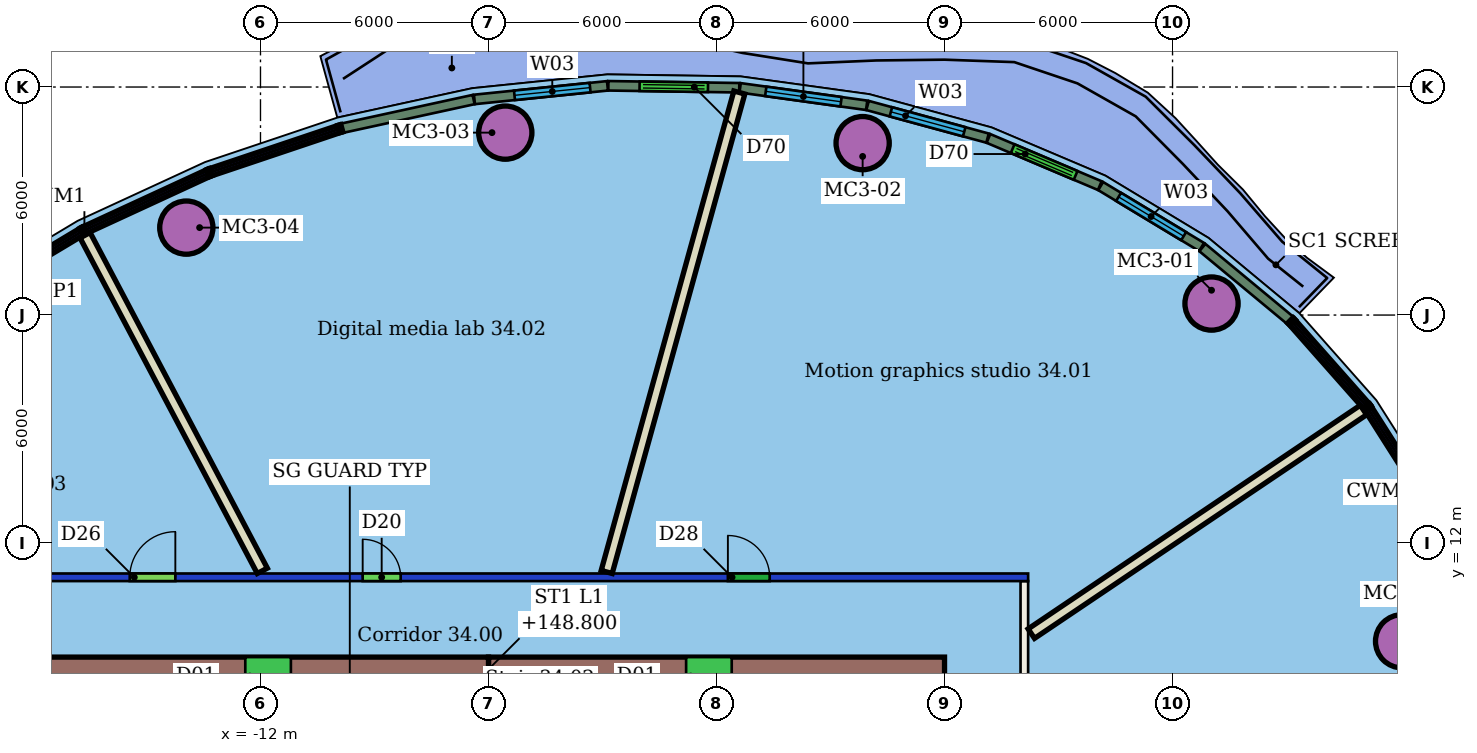
"""IFC4 building model, lengths in metres.
Left out: names, types, materials, properties, quantities, classifications, styles, units other than length and angle.
Written with IfcOpenShell. Run it as: python <this file> out.ifc"""

import sys

from ifc_helpers import new_model, si_unit, direction, frame, frame_2d, origin, origin_2d, place, context, subcontext, project, spatial, rectangle, hollow_circle, extrude, element, fill, save


model = new_model("IFC4")
c1 = context("Model", 3, precision=1e-05, world=origin(), true_north=direction((0.0, 1.0)))
c2 = subcontext(c1, "Body", "Model", "MODEL_VIEW")
j1 = project(units=[si_unit("LENGTHUNIT", "METRE"), si_unit("PLANEANGLEUNIT", "RADIAN")], contexts=[c1])
p1 = place(None, origin())
s1 = spatial("IfcSite", under=j1, at=p1, CompositionType="ELEMENT")
p2 = place(p1, origin())
s2 = spatial("IfcBuilding", under=s1, at=p2, CompositionType="ELEMENT")
p3 = place(p2, frame((0.0, 0.0, 147.0)))
s3 = spatial("IfcBuildingStorey", under=s2, at=p3, CompositionType="ELEMENT", Elevation=147.0)
for number, where, z_axis, x_axis in (
    (1, (13.026, 18.303, 0.0), (0.0, 0.0, 1.0), (1.0, 0.0, 0.0)),
    (2, (3.845, 22.524, 0.0), (0.0, 0.0, 1.0), (1.0, 0.0, 0.0)),
    (3, (-5.558, 22.8, 0.0), (0.0, 0.0, 1.0), (1.0, 0.0, 0.0)),
    (4, (-13.952, 20.301, 0.0), (0.0, 0.0, 1.0), (1.0, 0.0, 0.0)),
    (5, (18.041, 9.417, 0.0), (0.0, 0.0, 1.0), (1.0, 0.0, 0.0)),
):
    element("IfcColumn", number, at=place(p3, frame(where, z_axis=z_axis, x_axis=x_axis)), inside=s3, PredefinedType="COLUMN", context=c2, shape_type="SweptSolid", body=[
        extrude(hollow_circle(Radius=0.7, WallThickness=0.05, at=origin_2d()), origin(), (0.0, 0.0, 1.0), 3.45),
    ])
p4 = place(p3, frame((-20.2, 11.1, 0.0), z_axis=(0.0, 0.0, 1.0), x_axis=(1.0, 0.0, 0.0)))
e6 = element("IfcWall", 6, at=p4, inside=s3, PredefinedType="PARTITIONING", context=c2, shape_type="SweptSolid", body=[
    extrude(rectangle(XDim=28.4, YDim=0.2, at=frame_2d((14.2, 0.0))), origin(), (0.0, 0.0, 1.0), 3.05),
])
p5 = place(p4, frame((20.499, 0.0, 0.0)))
e7 = element("IfcOpeningElement", 7, at=p5, cuts=e6, PredefinedType="OPENING", context=c2, shape_type="SweptSolid", body=[
    extrude(rectangle(XDim=1.1, YDim=2.1, at=frame_2d((0.55, 1.05))), frame((0.0, 0.11, 0.0), z_axis=(0.0, -1.0, 0.0), x_axis=(1.0, 0.0, 0.0)), (0.0, 0.0, 1.0), 0.22),
])
p6 = place(p4, frame((10.889, 0.0, 0.0)))
e8 = element("IfcOpeningElement", 8, at=p6, cuts=e6, PredefinedType="OPENING", context=c2, shape_type="SweptSolid", body=[
    extrude(rectangle(XDim=1.0, YDim=2.1, at=frame_2d((0.5, 1.05))), frame((0.0, 0.11, 0.0), z_axis=(0.0, -1.0, 0.0), x_axis=(1.0, 0.0, 0.0)), (0.0, 0.0, 1.0), 0.22),
])
p7 = place(p4, frame((4.76, 0.0, 0.0)))
e9 = element("IfcOpeningElement", 9, at=p7, cuts=e6, PredefinedType="OPENING", context=c2, shape_type="SweptSolid", body=[
    extrude(rectangle(XDim=1.2, YDim=2.1, at=frame_2d((0.6, 1.05))), frame((0.0, 0.11, 0.0), z_axis=(0.0, -1.0, 0.0), x_axis=(1.0, 0.0, 0.0)), (0.0, 0.0, 1.0), 0.22),
])
p8 = place(p3, frame((8.1, 11.0, 0.0), z_axis=(0.0, 0.0, 1.0), x_axis=(0.0, -1.0, 0.0)))
e10 = element("IfcWall", 10, at=p8, inside=s3, PredefinedType="PARTITIONING", context=c2, shape_type="SweptSolid", body=[
    extrude(rectangle(XDim=22.0, YDim=0.2, at=frame_2d((11.0, 0.0))), origin(), (0.0, 0.0, 1.0), 3.45),
])
p9 = place(p8, frame((16.187, 0.0, 0.0)))
e11 = element("IfcOpeningElement", 11, at=p9, cuts=e10, PredefinedType="OPENING", context=c2, shape_type="SweptSolid", body=[
    extrude(rectangle(XDim=1.2, YDim=2.1, at=frame_2d((0.6, 1.05))), frame((0.0, 0.11, 0.0), z_axis=(0.0, -1.0, 0.0), x_axis=(1.0, 0.0, 0.0)), (0.0, 0.0, 1.0), 0.22),
])
p10 = place(p8, frame((8.659, 0.0, 0.0)))
e12 = element("IfcOpeningElement", 12, at=p10, cuts=e10, PredefinedType="OPENING", context=c2, shape_type="SweptSolid", body=[
    extrude(rectangle(XDim=1.8, YDim=2.1, at=frame_2d((0.9, 1.05))), frame((0.0, 0.11, 0.0), z_axis=(0.0, -1.0, 0.0), x_axis=(1.0, 0.0, 0.0)), (0.0, 0.0, 1.0), 0.22),
])
p11 = place(p3, frame((17.024, 15.502, 0.0), z_axis=(0.0, 0.0, 1.0), x_axis=(-0.82951075197, -0.558490745104, 0.0)))
e13 = element("IfcWall", 13, at=p11, inside=s3, PredefinedType="PARTITIONING", context=c2, shape_type="SweptSolid", body=[
    extrude(rectangle(XDim=10.537, YDim=0.3, at=frame_2d((5.269, 0.0))), origin(), (0.0, 0.0, 1.0), 3.45),
])
p12 = place(p3, frame((0.601, 23.856, 0.0), z_axis=(0.0, 0.0, 1.0), x_axis=(-0.266671206276, -0.963787563597, 0.0)))
e14 = element("IfcWall", 14, at=p12, inside=s3, PredefinedType="PARTITIONING", context=c2, shape_type="SweptSolid", body=[
    extrude(rectangle(XDim=13.09, YDim=0.3, at=frame_2d((6.545, 0.0))), origin(), (0.0, 0.0, 1.0), 3.45),
])
p13 = place(p3, frame((-16.616, 20.101, 0.0), z_axis=(0.0, 0.0, 1.0), x_axis=(0.467001313274, -0.884256621915, 0.0)))
e15 = element("IfcWall", 15, at=p13, inside=s3, PredefinedType="PARTITIONING", context=c2, shape_type="SweptSolid", body=[
    extrude(rectangle(XDim=9.987, YDim=0.3, at=frame_2d((4.994, 0.0))), origin(), (0.0, 0.0, 1.0), 3.45),
])
p14 = place(p3, frame((15.088, 17.867, 0.0), z_axis=(0.0, 0.0, 1.0), x_axis=(-0.769904678532, 0.638158903389, 0.0)))
e16 = element("IfcWall", 16, at=p14, inside=s3, PredefinedType="SOLIDWALL", context=c2, shape_type="SweptSolid", body=[
    extrude(rectangle(XDim=2.991, YDim=0.25, at=frame_2d((1.496, 0.0))), origin(), (0.0, 0.0, 1.0), 3.1),
])
p15 = place(p3, frame((12.763, 19.791, 0.0), z_axis=(0.0, 0.0, 1.0), x_axis=(-0.856079561846, 0.516844061386, 0.0)))
e17 = element("IfcWall", 17, at=p15, inside=s3, PredefinedType="SOLIDWALL", context=c2, shape_type="SweptSolid", body=[
    extrude(rectangle(XDim=3.101, YDim=0.25, at=frame_2d((1.551, 0.0))), origin(), (0.0, 0.0, 1.0), 3.1),
])
p16 = place(p15, frame((0.551, 0.0, 0.9)))
e18 = element("IfcOpeningElement", 18, at=p16, cuts=e17, PredefinedType="OPENING", context=c2, shape_type="SweptSolid", body=[
    extrude(rectangle(XDim=2.0, YDim=2.1, at=frame_2d((1.0, 1.05))), frame((0.0, 0.135, 0.0), z_axis=(0.0, -1.0, 0.0), x_axis=(1.0, 0.0, 0.0)), (0.0, 0.0, 1.0), 0.27),
])
p17 = place(p3, frame((10.086, 21.406, 0.0), z_axis=(0.0, 0.0, 1.0), x_axis=(-0.920752187735, 0.390147931919, 0.0)))
e19 = element("IfcWall", 19, at=p17, inside=s3, PredefinedType="SOLIDWALL", context=c2, shape_type="SweptSolid", body=[
    extrude(rectangle(XDim=3.183, YDim=0.25, at=frame_2d((1.591, 0.0))), origin(), (0.0, 0.0, 1.0), 3.1),
])
p18 = place(p17, frame((0.691, 0.0, 0.0)))
e20 = element("IfcOpeningElement", 20, at=p18, cuts=e19, PredefinedType="OPENING", context=c2, shape_type="SweptSolid", body=[
    extrude(rectangle(XDim=1.8, YDim=2.4, at=frame_2d((0.9, 1.2))), frame((0.0, 0.135, 0.0), z_axis=(0.0, -1.0, 0.0), x_axis=(1.0, 0.0, 0.0)), (0.0, 0.0, 1.0), 0.27),
])
p19 = place(p3, frame((7.132, 22.656, 0.0), z_axis=(0.0, 0.0, 1.0), x_axis=(-0.964946127674, 0.262448034261, 0.0)))
e21 = element("IfcWall", 21, at=p19, inside=s3, PredefinedType="SOLIDWALL", context=c2, shape_type="SweptSolid", body=[
    extrude(rectangle(XDim=3.272, YDim=0.25, at=frame_2d((1.636, 0.0))), origin(), (0.0, 0.0, 1.0), 3.1),
])
p20 = place(p19, frame((0.636, 0.0, 0.9)))
e22 = element("IfcOpeningElement", 22, at=p20, cuts=e21, PredefinedType="OPENING", context=c2, shape_type="SweptSolid", body=[
    extrude(rectangle(XDim=2.0, YDim=2.1, at=frame_2d((1.0, 1.05))), frame((0.0, 0.135, 0.0), z_axis=(0.0, -1.0, 0.0), x_axis=(1.0, 0.0, 0.0)), (0.0, 0.0, 1.0), 0.27),
])
p21 = place(p3, frame((3.951, 23.519, 0.0), z_axis=(0.0, 0.0, 1.0), x_axis=(-0.990602473809, 0.13677258089, 0.0)))
e23 = element("IfcWall", 23, at=p21, inside=s3, PredefinedType="SOLIDWALL", context=c2, shape_type="SweptSolid", body=[
    extrude(rectangle(XDim=3.361, YDim=0.25, at=frame_2d((1.681, 0.0))), origin(), (0.0, 0.0, 1.0), 3.1),
])
p22 = place(p21, frame((0.681, 0.0, 0.9)))
e24 = element("IfcOpeningElement", 24, at=p22, cuts=e23, PredefinedType="OPENING", context=c2, shape_type="SweptSolid", body=[
    extrude(rectangle(XDim=2.0, YDim=2.1, at=frame_2d((1.0, 1.05))), frame((0.0, 0.135, 0.0), z_axis=(0.0, -1.0, 0.0), x_axis=(1.0, 0.0, 0.0)), (0.0, 0.0, 1.0), 0.27),
])
p23 = place(p3, frame((0.598, 23.981, 0.0), z_axis=(0.0, 0.0, 1.0), x_axis=(-0.999886095883, 0.015092887706, 0.0)))
e25 = element("IfcWall", 25, at=p23, inside=s3, PredefinedType="SOLIDWALL", context=c2, shape_type="SweptSolid", body=[
    extrude(rectangle(XDim=3.446, YDim=0.25, at=frame_2d((1.723, 0.0))), origin(), (0.0, 0.0, 1.0), 3.1),
])
p24 = place(p23, frame((0.823, 0.0, 0.0)))
e26 = element("IfcOpeningElement", 26, at=p24, cuts=e25, PredefinedType="OPENING", context=c2, shape_type="SweptSolid", body=[
    extrude(rectangle(XDim=1.8, YDim=2.4, at=frame_2d((0.9, 1.2))), frame((0.0, 0.135, 0.0), z_axis=(0.0, -1.0, 0.0), x_axis=(1.0, 0.0, 0.0)), (0.0, 0.0, 1.0), 0.27),
])
p25 = place(p3, frame((-2.869, 24.032, 0.0), z_axis=(0.0, 0.0, 1.0), x_axis=(-0.994814248005, -0.101708465554, 0.0)))
e27 = element("IfcWall", 27, at=p25, inside=s3, PredefinedType="SOLIDWALL", context=c2, shape_type="SweptSolid", body=[
    extrude(rectangle(XDim=3.519, YDim=0.25, at=frame_2d((1.76, 0.0))), origin(), (0.0, 0.0, 1.0), 3.1),
])
p26 = place(p25, frame((0.46, 0.0, 0.9)))
e28 = element("IfcOpeningElement", 28, at=p26, cuts=e27, PredefinedType="OPENING", context=c2, shape_type="SweptSolid", body=[
    extrude(rectangle(XDim=2.0, YDim=2.1, at=frame_2d((1.0, 1.05))), frame((0.0, 0.135, 0.0), z_axis=(0.0, -1.0, 0.0), x_axis=(1.0, 0.0, 0.0)), (0.0, 0.0, 1.0), 0.27),
])
p27 = place(p3, frame((-6.392, 23.67, 0.0), z_axis=(0.0, 0.0, 1.0), x_axis=(-0.97705524613, -0.212986023038, 0.0)))
e29 = element("IfcWall", 29, at=p27, inside=s3, PredefinedType="SOLIDWALL", context=c2, shape_type="SweptSolid", body=[
    extrude(rectangle(XDim=3.534, YDim=0.25, at=frame_2d((1.767, 0.0))), origin(), (0.0, 0.0, 1.0), 3.1),
])
p28 = place(p3, frame((6.0, 8.5, 0.0), z_axis=(0.0, 0.0, 1.0), x_axis=(-1.0, 0.0, 0.0)))
e30 = element("IfcWall", 30, at=p28, inside=s3, PredefinedType="SHEAR", context=c2, shape_type="SweptSolid", body=[
    extrude(rectangle(XDim=12.0, YDim=1.0, at=frame_2d((6.0, 0.0))), origin(), (0.0, 0.0, 1.0), 3.3),
])
p29 = place(p28, frame((5.6, 0.0, 0.0)))
e31 = element("IfcOpeningElement", 31, at=p29, cuts=e30, PredefinedType="OPENING", context=c2, shape_type="SweptSolid", body=[
    extrude(rectangle(XDim=1.2, YDim=2.1, at=frame_2d((0.6, 1.05))), frame((0.0, 0.51, 0.0), z_axis=(0.0, -1.0, 0.0), x_axis=(1.0, 0.0, 0.0)), (0.0, 0.0, 1.0), 1.02),
])
p30 = place(p3, frame((-6.0, 8.5, 0.0), z_axis=(0.0, 0.0, 1.0), x_axis=(-1.0, 0.0, 0.0)))
e32 = element("IfcWall", 32, at=p30, inside=s3, PredefinedType="SHEAR", context=c2, shape_type="SweptSolid", body=[
    extrude(rectangle(XDim=12.0, YDim=1.0, at=frame_2d((6.0, 0.0))), origin(), (0.0, 0.0, 1.0), 3.3),
])
p31 = place(p30, frame((5.2, 0.0, 0.0)))
e33 = element("IfcOpeningElement", 33, at=p31, cuts=e32, PredefinedType="OPENING", context=c2, shape_type="SweptSolid", body=[
    extrude(rectangle(XDim=1.2, YDim=2.1, at=frame_2d((0.6, 1.05))), frame((0.0, 0.51, 0.0), z_axis=(0.0, -1.0, 0.0), x_axis=(1.0, 0.0, 0.0)), (0.0, 0.0, 1.0), 1.02),
])
p32 = place(p5, origin())
e34 = element("IfcDoor", 34, at=p32, inside=s3, OperationType="SINGLE_SWING_LEFT", PredefinedType="DOOR", context=c2, shape_type="SweptSolid", body=[
    extrude(rectangle(XDim=1.1, YDim=2.1, at=frame_2d((0.55, 1.05))), frame((0.0, 0.025, 0.0), z_axis=(0.0, -1.0, 0.0), x_axis=(1.0, 0.0, 0.0)), (0.0, 0.0, 1.0), 0.05),
])
fill(e7, e34)
p33 = place(p6, origin())
e35 = element("IfcDoor", 35, at=p33, inside=s3, OperationType="SINGLE_SWING_LEFT", PredefinedType="DOOR", context=c2, shape_type="SweptSolid", body=[
    extrude(rectangle(XDim=1.0, YDim=2.1, at=frame_2d((0.5, 1.05))), frame((0.0, 0.025, 0.0), z_axis=(0.0, -1.0, 0.0), x_axis=(1.0, 0.0, 0.0)), (0.0, 0.0, 1.0), 0.05),
])
fill(e8, e35)
p34 = place(p7, origin())
e36 = element("IfcDoor", 36, at=p34, inside=s3, OperationType="SINGLE_SWING_RIGHT", PredefinedType="DOOR", context=c2, shape_type="SweptSolid", body=[
    extrude(rectangle(XDim=1.2, YDim=2.1, at=frame_2d((0.6, 1.05))), frame((0.0, 0.025, 0.0), z_axis=(0.0, -1.0, 0.0), x_axis=(1.0, 0.0, 0.0)), (0.0, 0.0, 1.0), 0.05),
])
fill(e9, e36)
p35 = place(p16, origin())
e37 = element("IfcWindow", 37, at=p35, inside=s3, PartitioningType="SINGLE_PANEL", PredefinedType="WINDOW", context=c2, shape_type="SweptSolid", body=[
    extrude(rectangle(XDim=2.0, YDim=2.1, at=frame_2d((1.0, 1.05))), frame((0.0, 0.03, 0.0), z_axis=(0.0, -1.0, 0.0), x_axis=(1.0, 0.0, 0.0)), (0.0, 0.0, 1.0), 0.06),
])
fill(e18, e37)
p36 = place(p18, origin())
e38 = element("IfcDoor", 38, at=p36, inside=s3, OperationType="DOUBLE_DOOR_SLIDING", PredefinedType="DOOR", context=c2, shape_type="SweptSolid", body=[
    extrude(rectangle(XDim=1.8, YDim=2.4, at=frame_2d((0.9, 1.2))), frame((0.0, 0.025, 0.0), z_axis=(0.0, -1.0, 0.0), x_axis=(1.0, 0.0, 0.0)), (0.0, 0.0, 1.0), 0.05),
])
fill(e20, e38)
p37 = place(p20, origin())
e39 = element("IfcWindow", 39, at=p37, inside=s3, PartitioningType="SINGLE_PANEL", PredefinedType="WINDOW", context=c2, shape_type="SweptSolid", body=[
    extrude(rectangle(XDim=2.0, YDim=2.1, at=frame_2d((1.0, 1.05))), frame((0.0, 0.03, 0.0), z_axis=(0.0, -1.0, 0.0), x_axis=(1.0, 0.0, 0.0)), (0.0, 0.0, 1.0), 0.06),
])
fill(e22, e39)
p38 = place(p22, origin())
e40 = element("IfcWindow", 40, at=p38, inside=s3, PartitioningType="SINGLE_PANEL", PredefinedType="WINDOW", context=c2, shape_type="SweptSolid", body=[
    extrude(rectangle(XDim=2.0, YDim=2.1, at=frame_2d((1.0, 1.05))), frame((0.0, 0.03, 0.0), z_axis=(0.0, -1.0, 0.0), x_axis=(1.0, 0.0, 0.0)), (0.0, 0.0, 1.0), 0.06),
])
fill(e24, e40)
p39 = place(p24, origin())
e41 = element("IfcDoor", 41, at=p39, inside=s3, OperationType="DOUBLE_DOOR_SLIDING", PredefinedType="DOOR", context=c2, shape_type="SweptSolid", body=[
    extrude(rectangle(XDim=1.8, YDim=2.4, at=frame_2d((0.9, 1.2))), frame((0.0, 0.025, 0.0), z_axis=(0.0, -1.0, 0.0), x_axis=(1.0, 0.0, 0.0)), (0.0, 0.0, 1.0), 0.05),
])
fill(e26, e41)
p40 = place(p26, origin())
e42 = element("IfcWindow", 42, at=p40, inside=s3, PartitioningType="SINGLE_PANEL", PredefinedType="WINDOW", context=c2, shape_type="SweptSolid", body=[
    extrude(rectangle(XDim=2.0, YDim=2.1, at=frame_2d((1.0, 1.05))), frame((0.0, 0.03, 0.0), z_axis=(0.0, -1.0, 0.0), x_axis=(1.0, 0.0, 0.0)), (0.0, 0.0, 1.0), 0.06),
])
fill(e28, e42)
save(model, sys.argv[1])
